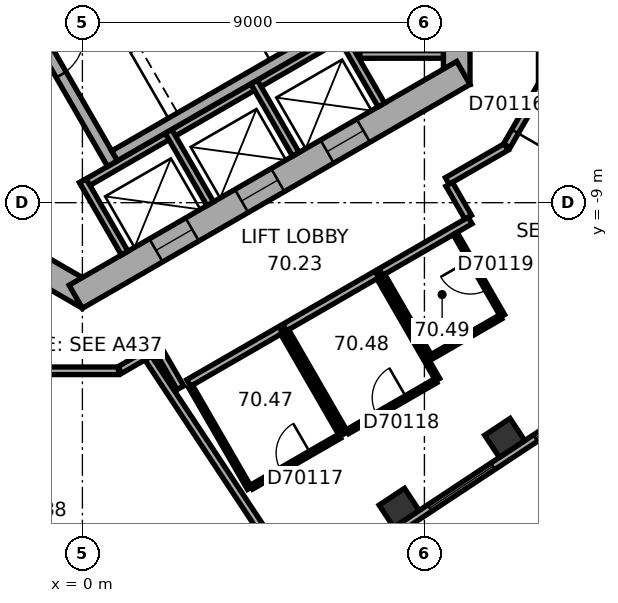
"""IFC4 building model, lengths in metres.
Left out: names, types, materials, properties, quantities, classifications, styles, units other than length and angle.
Written with IfcOpenShell. Run it as: python <this file> out.ifc"""

import sys

from ifc_helpers import new_model, si_unit, direction, frame, frame_2d, origin, origin_2d, place, context, subcontext, project, spatial, rectangle, extrude, element, fill, save


model = new_model("IFC4")
c1 = context("Model", 3, precision=1e-05, world=origin(), true_north=direction((0.0, 1.0)))
c2 = subcontext(c1, "Body", "Model", "MODEL_VIEW")
j1 = project(units=[si_unit("LENGTHUNIT", "METRE"), si_unit("PLANEANGLEUNIT", "RADIAN")], contexts=[c1])
p1 = place(None, origin())
s1 = spatial("IfcSite", under=j1, at=p1, CompositionType="ELEMENT")
p2 = place(p1, origin())
s2 = spatial("IfcBuilding", under=s1, at=p2, CompositionType="ELEMENT")
p3 = place(p2, frame((0.0, 0.0, 285.7)))
s3 = spatial("IfcBuildingStorey", under=s2, at=p3, CompositionType="ELEMENT", Elevation=285.7)
for number, where, z_axis, x_axis in (
    (1, (8.335, -17.028, 0.0), (0.0, 0.0, 1.0), (0.834, 0.552, 0.0)),
    (2, (11.113, -15.189, 0.0), (0.0, 0.0, 1.0), (0.834, 0.552, 0.0)),
):
    element("IfcColumn", number, at=place(p3, frame(where, z_axis=z_axis, x_axis=x_axis)), inside=s3, PredefinedType="COLUMN", context=c2, shape_type="SweptSolid", body=[
        extrude(rectangle(XDim=0.8, YDim=0.7, at=origin_2d()), origin(), (0.0, 0.0, 1.0), 3.7),
    ])
p4 = place(p3, frame((9.85, -5.889, 0.0), z_axis=(0.0, 0.0, 1.0), x_axis=(0.0, 1.0, 0.0)))
e3 = element("IfcWall", 3, at=p4, inside=s3, PredefinedType="SHEAR", context=c2, shape_type="SweptSolid", body=[
    extrude(rectangle(XDim=11.778, YDim=0.7, at=frame_2d((5.889, 0.0))), origin(), (0.0, 0.0, 1.0), 3.7),
])
p5 = place(p4, frame((6.089, 0.0, 0.0)))
e4 = element("IfcOpeningElement", 4, at=p5, cuts=e3, PredefinedType="OPENING", context=c2, shape_type="SweptSolid", body=[
    extrude(rectangle(XDim=1.5, YDim=2.1, at=frame_2d((0.75, 1.05))), frame((0.0, 0.36, 0.0), z_axis=(0.0, -1.0, 0.0), x_axis=(1.0, 0.0, 0.0)), (0.0, 0.0, 1.0), 0.72),
])
p6 = place(p4, frame((2.939, 0.0, 0.0)))
e5 = element("IfcOpeningElement", 5, at=p6, cuts=e3, PredefinedType="OPENING", context=c2, shape_type="SweptSolid", body=[
    extrude(rectangle(XDim=0.9, YDim=2.1, at=frame_2d((0.45, 1.05))), frame((0.0, 0.36, 0.0), z_axis=(0.0, -1.0, 0.0), x_axis=(1.0, 0.0, 0.0)), (0.0, 0.0, 1.0), 0.72),
])
p7 = place(p3, frame((-10.025, -5.586, 0.0), z_axis=(0.0, 0.0, 1.0), x_axis=(0.866026453023, -0.499998182661, 0.0)))
e6 = element("IfcWall", 6, at=p7, inside=s3, PredefinedType="SHEAR", context=c2, shape_type="SweptSolid", body=[
    extrude(rectangle(XDim=11.778, YDim=0.7, at=frame_2d((5.889, 0.0))), origin(), (0.0, 0.0, 1.0), 3.7),
])
p8 = place(p7, frame((6.089, 0.0, 0.0)))
e7 = element("IfcOpeningElement", 7, at=p8, cuts=e6, PredefinedType="OPENING", context=c2, shape_type="SweptSolid", body=[
    extrude(rectangle(XDim=1.5, YDim=2.1, at=frame_2d((0.75, 1.05))), frame((0.0, 0.36, 0.0), z_axis=(0.0, -1.0, 0.0), x_axis=(1.0, 0.0, 0.0)), (0.0, 0.0, 1.0), 0.72),
])
p9 = place(p7, frame((1.539, 0.0, 0.0)))
e8 = element("IfcOpeningElement", 8, at=p9, cuts=e6, PredefinedType="OPENING", context=c2, shape_type="SweptSolid", body=[
    extrude(rectangle(XDim=1.1, YDim=2.1, at=frame_2d((0.55, 1.05))), frame((0.0, 0.36, 0.0), z_axis=(0.0, -1.0, 0.0), x_axis=(1.0, 0.0, 0.0)), (0.0, 0.0, 1.0), 0.72),
])
p10 = place(p7, frame((4.139, 0.0, 0.0)))
e9 = element("IfcOpeningElement", 9, at=p10, cuts=e6, PredefinedType="OPENING", context=c2, shape_type="SweptSolid", body=[
    extrude(rectangle(XDim=1.1, YDim=2.1, at=frame_2d((0.55, 1.05))), frame((0.0, 0.36, 0.0), z_axis=(0.0, -1.0, 0.0), x_axis=(1.0, 0.0, 0.0)), (0.0, 0.0, 1.0), 0.72),
])
p11 = place(p3, frame((-0.175, -11.475, 0.0), z_axis=(0.0, 0.0, 1.0), x_axis=(0.866026453023, 0.499998182661, 0.0)))
e10 = element("IfcWall", 10, at=p11, inside=s3, PredefinedType="SHEAR", context=c2, shape_type="SweptSolid", body=[
    extrude(rectangle(XDim=11.778, YDim=0.7, at=frame_2d((5.889, 0.0))), origin(), (0.0, 0.0, 1.0), 3.7),
])
p12 = place(p11, frame((2.439, 0.0, 0.0)))
e11 = element("IfcOpeningElement", 11, at=p12, cuts=e10, PredefinedType="OPENING", context=c2, shape_type="SweptSolid", body=[
    extrude(rectangle(XDim=1.1, YDim=2.1, at=frame_2d((0.55, 1.05))), frame((0.0, 0.36, 0.0), z_axis=(0.0, -1.0, 0.0), x_axis=(1.0, 0.0, 0.0)), (0.0, 0.0, 1.0), 0.72),
])
p13 = place(p11, frame((5.039, 0.0, 0.0)))
e12 = element("IfcOpeningElement", 12, at=p13, cuts=e10, PredefinedType="OPENING", context=c2, shape_type="SweptSolid", body=[
    extrude(rectangle(XDim=1.1, YDim=2.1, at=frame_2d((0.55, 1.05))), frame((0.0, 0.36, 0.0), z_axis=(0.0, -1.0, 0.0), x_axis=(1.0, 0.0, 0.0)), (0.0, 0.0, 1.0), 0.72),
])
p14 = place(p11, frame((7.639, 0.0, 0.0)))
e13 = element("IfcOpeningElement", 13, at=p14, cuts=e10, PredefinedType="OPENING", context=c2, shape_type="SweptSolid", body=[
    extrude(rectangle(XDim=1.1, YDim=2.1, at=frame_2d((0.55, 1.05))), frame((0.0, 0.36, 0.0), z_axis=(0.0, -1.0, 0.0), x_axis=(1.0, 0.0, 0.0)), (0.0, 0.0, 1.0), 0.72),
])
p15 = place(p3, frame((2.58, -21.377, 0.0), z_axis=(0.0, 0.0, 1.0), x_axis=(0.833888592176, 0.551932800112, 0.0)))
e14 = element("IfcWall", 14, at=p15, inside=s3, PredefinedType="STANDARD", context=c2, shape_type="SweptSolid", body=[
    extrude(rectangle(XDim=17.731, YDim=0.2, at=frame_2d((8.866, 0.0))), origin(), (0.0, 0.0, 1.0), 3.7),
])
p16 = place(p15, frame((1.202, 0.0, 0.9)))
e15 = element("IfcOpeningElement", 15, at=p16, cuts=e14, PredefinedType="OPENING", context=c2, shape_type="SweptSolid", body=[
    extrude(rectangle(XDim=2.0, YDim=2.0, at=frame_2d((1.0, 1.0))), frame((0.0, 0.11, 0.0), z_axis=(0.0, -1.0, 0.0), x_axis=(1.0, 0.0, 0.0)), (0.0, 0.0, 1.0), 0.22),
])
p17 = place(p15, frame((4.533, 0.0, 0.9)))
e16 = element("IfcOpeningElement", 16, at=p17, cuts=e14, PredefinedType="OPENING", context=c2, shape_type="SweptSolid", body=[
    extrude(rectangle(XDim=2.0, YDim=2.0, at=frame_2d((1.0, 1.0))), frame((0.0, 0.11, 0.0), z_axis=(0.0, -1.0, 0.0), x_axis=(1.0, 0.0, 0.0)), (0.0, 0.0, 1.0), 0.22),
])
p18 = place(p15, frame((7.865, 0.0, 0.9)))
e17 = element("IfcOpeningElement", 17, at=p18, cuts=e14, PredefinedType="OPENING", context=c2, shape_type="SweptSolid", body=[
    extrude(rectangle(XDim=2.0, YDim=2.0, at=frame_2d((1.0, 1.0))), frame((0.0, 0.11, 0.0), z_axis=(0.0, -1.0, 0.0), x_axis=(1.0, 0.0, 0.0)), (0.0, 0.0, 1.0), 0.22),
])
p19 = place(p15, frame((11.197, 0.0, 0.9)))
e18 = element("IfcOpeningElement", 18, at=p19, cuts=e14, PredefinedType="OPENING", context=c2, shape_type="SweptSolid", body=[
    extrude(rectangle(XDim=2.0, YDim=2.0, at=frame_2d((1.0, 1.0))), frame((0.0, 0.11, 0.0), z_axis=(0.0, -1.0, 0.0), x_axis=(1.0, 0.0, 0.0)), (0.0, 0.0, 1.0), 0.22),
])
p20 = place(p15, frame((14.528, 0.0, 0.9)))
e19 = element("IfcOpeningElement", 19, at=p20, cuts=e14, PredefinedType="OPENING", context=c2, shape_type="SweptSolid", body=[
    extrude(rectangle(XDim=2.0, YDim=2.0, at=frame_2d((1.0, 1.0))), frame((0.0, 0.11, 0.0), z_axis=(0.0, -1.0, 0.0), x_axis=(1.0, 0.0, 0.0)), (0.0, 0.0, 1.0), 0.22),
])
p21 = place(p3, frame((7.4, -5.2, 0.0), z_axis=(0.0, 0.0, 1.0), x_axis=(0.0, 1.0, 0.0)))
e20 = element("IfcWall", 20, at=p21, inside=s3, PredefinedType="PARTITIONING", context=c2, shape_type="SweptSolid", body=[
    extrude(rectangle(XDim=5.4, YDim=0.2, at=frame_2d((2.7, 0.0))), origin(), (0.0, 0.0, 1.0), 3.42),
])
p22 = place(p3, frame((7.3, -5.1, 0.0), z_axis=(0.0, 0.0, 1.0), x_axis=(1.0, 0.0, 0.0)))
e21 = element("IfcWall", 21, at=p22, inside=s3, PredefinedType="PARTITIONING", context=c2, shape_type="SweptSolid", body=[
    extrude(rectangle(XDim=2.2, YDim=0.2, at=frame_2d((1.1, 0.0))), origin(), (0.0, 0.0, 1.0), 3.42),
])
p23 = place(p3, frame((-0.024, -8.559, 0.0), z_axis=(0.0, 0.0, 1.0), x_axis=(0.866026010844, 0.49999894854, 0.0)))
e22 = element("IfcWall", 22, at=p23, inside=s3, PredefinedType="PARTITIONING", context=c2, shape_type="SweptSolid", body=[
    extrude(rectangle(XDim=8.0, YDim=0.2, at=frame_2d((4.0, 0.0))), origin(), (0.0, 0.0, 1.0), 3.42),
])
for number, where, z_axis, x_axis in (
    (23, (0.013, -8.422, 0.0), (0.0, 0.0, 1.0), (0.5, -0.866, 0.0)),
    (24, (2.264, -7.122, 0.0), (0.0, 0.0, 1.0), (0.5, -0.866, 0.0)),
    (25, (4.516, -5.822, 0.0), (0.0, 0.0, 1.0), (0.5, -0.866, 0.0)),
    (26, (6.768, -4.522, 0.0), (0.0, 0.0, 1.0), (0.5, -0.866, 0.0)),
):
    element("IfcWall", number, at=place(p3, frame(where, z_axis=z_axis, x_axis=x_axis)), inside=s3, PredefinedType="PARTITIONING", context=c2, shape_type="SweptSolid", body=[
        extrude(rectangle(XDim=2.2, YDim=0.2, at=frame_2d((1.1, 0.0))), origin(), (0.0, 0.0, 1.0), 3.42),
    ])
p24 = place(p3, frame((-1.558, -3.902, 0.0), z_axis=(0.0, 0.0, 1.0), x_axis=(0.499977259774, -0.866038532462, 0.0)))
e27 = element("IfcWall", 27, at=p24, inside=s3, PredefinedType="SHEAR", context=c2, shape_type="SweptSolid", body=[
    extrude(rectangle(XDim=4.7, YDim=0.3, at=frame_2d((2.35, 0.0))), origin(), (0.0, 0.0, 1.0), 3.42),
])
p25 = place(p24, frame((0.8, 0.0, 0.0)))
e28 = element("IfcOpeningElement", 28, at=p25, cuts=e27, PredefinedType="OPENING", context=c2, shape_type="SweptSolid", body=[
    extrude(rectangle(XDim=1.2, YDim=2.1, at=frame_2d((0.6, 1.05))), frame((0.0, 0.16, 0.0), z_axis=(0.0, -1.0, 0.0), x_axis=(1.0, 0.0, 0.0)), (0.0, 0.0, 1.0), 0.32),
])
p26 = place(p3, frame((0.847, -7.767, 0.0), z_axis=(0.0, 0.0, 1.0), x_axis=(0.866027801685, 0.499995846692, 0.0)))
e29 = element("IfcWall", 29, at=p26, inside=s3, PredefinedType="SHEAR", context=c2, shape_type="SweptSolid", body=[
    extrude(rectangle(XDim=7.06, YDim=0.3, at=frame_2d((3.53, 0.0))), origin(), (0.0, 0.0, 1.0), 3.42),
])
p27 = place(p3, frame((-0.91, -13.423, 0.0), z_axis=(0.0, 0.0, 1.0), x_axis=(1.0, 0.0, 0.0)))
e30 = element("IfcWall", 30, at=p27, inside=s3, PredefinedType="PARTITIONING", context=c2, shape_type="SweptSolid", body=[
    extrude(rectangle(XDim=1.86, YDim=0.2, at=frame_2d((0.93, 0.0))), origin(), (0.0, 0.0, 1.0), 3.42),
])
p28 = place(p3, frame((0.985, -13.403, 0.0), z_axis=(0.0, 0.0, 1.0), x_axis=(0.866032814021, 0.499987164874, 0.0)))
e31 = element("IfcWall", 31, at=p28, inside=s3, PredefinedType="PARTITIONING", context=c2, shape_type="SweptSolid", body=[
    extrude(rectangle(XDim=0.798, YDim=0.2, at=frame_2d((0.399, 0.0))), origin(), (0.0, 0.0, 1.0), 3.42),
])
p29 = place(p3, frame((1.979, -12.829, 0.0), z_axis=(0.0, 0.0, 1.0), x_axis=(0.500074377092, -0.865982457891, 0.0)))
e32 = element("IfcWall", 32, at=p29, inside=s3, PredefinedType="PARTITIONING", context=c2, shape_type="SweptSolid", body=[
    extrude(rectangle(XDim=1.201, YDim=0.2, at=frame_2d((0.601, 0.0))), origin(), (0.0, 0.0, 1.0), 3.42),
])
p30 = place(p3, frame((2.796, -13.744, 0.0), z_axis=(0.0, 0.0, 1.0), x_axis=(0.866034573852, 0.49998411664, 0.0)))
e33 = element("IfcWall", 33, at=p30, inside=s3, PredefinedType="PARTITIONING", context=c2, shape_type="SweptSolid", body=[
    extrude(rectangle(XDim=2.8, YDim=0.2, at=frame_2d((1.4, 0.0))), origin(), (0.0, 0.0, 1.0), 3.42),
])
p31 = place(p3, frame((4.396, -16.516, 0.0), z_axis=(0.0, 0.0, 1.0), x_axis=(-0.49999285859, 0.86602952684, 0.0)))
e34 = element("IfcWall", 34, at=p31, inside=s3, PredefinedType="PARTITIONING", context=c2, shape_type="SweptSolid", body=[
    extrude(rectangle(XDim=3.1, YDim=0.12, at=frame_2d((1.55, 0.0))), origin(), (0.0, 0.0, 1.0), 3.42),
])
p32 = place(p3, frame((5.271, -12.431, 0.0), z_axis=(0.0, 0.0, 1.0), x_axis=(0.500026960575, -0.86600983753, 0.0)))
e35 = element("IfcWall", 35, at=p32, inside=s3, PredefinedType="PARTITIONING", context=c2, shape_type="SweptSolid", body=[
    extrude(rectangle(XDim=3.1, YDim=0.12, at=frame_2d((1.55, 0.0))), origin(), (0.0, 0.0, 1.0), 3.42),
])
p33 = place(p3, frame((5.325, -12.284, 0.0), z_axis=(0.0, 0.0, 1.0), x_axis=(0.866034573852, 0.49998411664, 0.0)))
e36 = element("IfcWall", 36, at=p33, inside=s3, PredefinedType="PARTITIONING", context=c2, shape_type="SweptSolid", body=[
    extrude(rectangle(XDim=2.8, YDim=0.2, at=frame_2d((1.4, 0.0))), origin(), (0.0, 0.0, 1.0), 3.42),
])
p34 = place(p3, frame((5.364, -18.575, 0.0), z_axis=(0.0, 0.0, 1.0), x_axis=(-0.55195757761, 0.833872191957, 0.0)))
e37 = element("IfcWall", 37, at=p34, inside=s3, PredefinedType="PARTITIONING", context=c2, shape_type="SweptSolid", body=[
    extrude(rectangle(XDim=6.581, YDim=0.2, at=frame_2d((3.291, 0.0))), origin(), (0.0, 0.0, 1.0), 3.42),
])
p35 = place(p3, frame((6.769, -15.146, 0.0), z_axis=(0.0, 0.0, 1.0), x_axis=(-0.866020236886, -0.500008949224, 0.0)))
e38 = element("IfcWall", 38, at=p35, inside=s3, PredefinedType="PARTITIONING", context=c2, shape_type="SweptSolid", body=[
    extrude(rectangle(XDim=2.68, YDim=0.12, at=frame_2d((1.34, 0.0))), origin(), (0.0, 0.0, 1.0), 3.42),
])
p36 = place(p35, frame((0.89, 0.0, 0.0)))
e39 = element("IfcOpeningElement", 39, at=p36, cuts=e38, PredefinedType="OPENING", context=c2, shape_type="SweptSolid", body=[
    extrude(rectangle(XDim=0.9, YDim=2.1, at=frame_2d((0.45, 1.05))), frame((0.0, 0.07, 0.0), z_axis=(0.0, -1.0, 0.0), x_axis=(1.0, 0.0, 0.0)), (0.0, 0.0, 1.0), 0.14),
])
p37 = place(p3, frame((6.925, -15.056, 0.0), z_axis=(0.0, 0.0, 1.0), x_axis=(-0.49999285859, 0.86602952684, 0.0)))
e40 = element("IfcWall", 40, at=p37, inside=s3, PredefinedType="PARTITIONING", context=c2, shape_type="SweptSolid", body=[
    extrude(rectangle(XDim=3.1, YDim=0.12, at=frame_2d((1.55, 0.0))), origin(), (0.0, 0.0, 1.0), 2.87),
])
p38 = place(p3, frame((7.8, -10.971, 0.0), z_axis=(0.0, 0.0, 1.0), x_axis=(0.500026960575, -0.86600983753, 0.0)))
e41 = element("IfcWall", 41, at=p38, inside=s3, PredefinedType="PARTITIONING", context=c2, shape_type="SweptSolid", body=[
    extrude(rectangle(XDim=3.1, YDim=0.12, at=frame_2d((1.55, 0.0))), origin(), (0.0, 0.0, 1.0), 3.42),
])
p39 = place(p3, frame((7.854, -10.824, 0.0), z_axis=(0.0, 0.0, 1.0), x_axis=(0.866029675718, 0.499992600721, 0.0)))
e42 = element("IfcWall", 42, at=p39, inside=s3, PredefinedType="PARTITIONING", context=c2, shape_type="SweptSolid", body=[
    extrude(rectangle(XDim=2.712, YDim=0.2, at=frame_2d((1.356, 0.0))), origin(), (0.0, 0.0, 1.0), 3.42),
])
p40 = place(p3, frame((9.153, -13.076, 0.0), z_axis=(0.0, 0.0, 1.0), x_axis=(-0.500004234368, 0.866022959057, 0.0)))
e43 = element("IfcWall", 43, at=p40, inside=s3, PredefinedType="PARTITIONING", context=c2, shape_type="SweptSolid", body=[
    extrude(rectangle(XDim=2.5, YDim=0.12, at=frame_2d((1.25, 0.0))), origin(), (0.0, 0.0, 1.0), 3.42),
])
p41 = place(p3, frame((9.298, -13.686, 0.0), z_axis=(0.0, 0.0, 1.0), x_axis=(-0.866020236886, -0.500008949224, 0.0)))
e44 = element("IfcWall", 44, at=p41, inside=s3, PredefinedType="PARTITIONING", context=c2, shape_type="SweptSolid", body=[
    extrude(rectangle(XDim=2.68, YDim=0.12, at=frame_2d((1.34, 0.0))), origin(), (0.0, 0.0, 1.0), 3.42),
])
p42 = place(p41, frame((0.89, 0.0, 0.0)))
e45 = element("IfcOpeningElement", 45, at=p42, cuts=e44, PredefinedType="OPENING", context=c2, shape_type="SweptSolid", body=[
    extrude(rectangle(XDim=0.9, YDim=2.1, at=frame_2d((0.45, 1.05))), frame((0.0, 0.07, 0.0), z_axis=(0.0, -1.0, 0.0), x_axis=(1.0, 0.0, 0.0)), (0.0, 0.0, 1.0), 0.14),
])
p43 = place(p3, frame((9.602, -8.428, 0.0), z_axis=(0.0, 0.0, 1.0), x_axis=(0.865999114786, 0.500045531117, 0.0)))
e46 = element("IfcWall", 46, at=p43, inside=s3, PredefinedType="PARTITIONING", context=c2, shape_type="SweptSolid", body=[
    extrude(rectangle(XDim=1.788, YDim=0.2, at=frame_2d((0.894, 0.0))), origin(), (0.0, 0.0, 1.0), 3.42),
])
p44 = place(p3, frame((9.809, -9.811, 0.0), z_axis=(0.0, 0.0, 1.0), x_axis=(0.499961950354, -0.866047370643, 0.0)))
e47 = element("IfcWall", 47, at=p44, inside=s3, PredefinedType="PARTITIONING", context=c2, shape_type="SweptSolid", body=[
    extrude(rectangle(XDim=2.5, YDim=0.12, at=frame_2d((1.25, 0.0))), origin(), (0.0, 0.0, 1.0), 3.42),
])
p45 = place(p44, frame((0.8, 0.0, 0.0)))
e48 = element("IfcOpeningElement", 48, at=p45, cuts=e47, PredefinedType="OPENING", context=c2, shape_type="SweptSolid", body=[
    extrude(rectangle(XDim=0.9, YDim=2.1, at=frame_2d((0.45, 1.05))), frame((0.0, 0.07, 0.0), z_axis=(0.0, -1.0, 0.0), x_axis=(1.0, 0.0, 0.0)), (0.0, 0.0, 1.0), 0.14),
])
p46 = place(p3, frame((10.152, -9.382, 0.0), z_axis=(0.0, 0.0, 1.0), x_axis=(-0.499968756647, 0.866043441391, 0.0)))
e49 = element("IfcWall", 49, at=p46, inside=s3, PredefinedType="PARTITIONING", context=c2, shape_type="SweptSolid", body=[
    extrude(rectangle(XDim=1.001, YDim=0.2, at=frame_2d((0.5, 0.0))), origin(), (0.0, 0.0, 1.0), 3.42),
])
p47 = place(p3, frame((11.007, -12.006, 0.0), z_axis=(0.0, 0.0, 1.0), x_axis=(-0.866009661879, -0.500027264788, 0.0)))
e50 = element("IfcWall", 50, at=p47, inside=s3, PredefinedType="PARTITIONING", context=c2, shape_type="SweptSolid", body=[
    extrude(rectangle(XDim=2.08, YDim=0.12, at=frame_2d((1.04, 0.0))), origin(), (0.0, 0.0, 1.0), 3.42),
])
p48 = place(p3, frame((11.17, -7.5, 0.0), z_axis=(0.0, 0.0, 1.0), x_axis=(0.500006454166, 0.866021677438, 0.0)))
e51 = element("IfcWall", 51, at=p48, inside=s3, PredefinedType="PARTITIONING", context=c2, shape_type="SweptSolid", body=[
    extrude(rectangle(XDim=1.86, YDim=0.2, at=frame_2d((0.93, 0.0))), origin(), (0.0, 0.0, 1.0), 3.42),
])
p49 = place(p48, frame((0.43, 0.0, 0.0)))
e52 = element("IfcOpeningElement", 52, at=p49, cuts=e51, PredefinedType="OPENING", context=c2, shape_type="SweptSolid", body=[
    extrude(rectangle(XDim=1.0, YDim=2.1, at=frame_2d((0.5, 1.05))), frame((0.0, 0.11, 0.0), z_axis=(0.0, -1.0, 0.0), x_axis=(1.0, 0.0, 0.0)), (0.0, 0.0, 1.0), 0.22),
])
p50 = place(p18, origin())
e53 = element("IfcWindow", 53, at=p50, inside=s3, PartitioningType="SINGLE_PANEL", PredefinedType="WINDOW", context=c2, shape_type="SweptSolid", body=[
    extrude(rectangle(XDim=2.0, YDim=2.0, at=frame_2d((1.0, 1.0))), frame((0.0, 0.03, 0.0), z_axis=(0.0, -1.0, 0.0), x_axis=(1.0, 0.0, 0.0)), (0.0, 0.0, 1.0), 0.06),
])
fill(e17, e53)
p51 = place(p19, origin())
e54 = element("IfcWindow", 54, at=p51, inside=s3, PartitioningType="SINGLE_PANEL", PredefinedType="WINDOW", context=c2, shape_type="SweptSolid", body=[
    extrude(rectangle(XDim=2.0, YDim=2.0, at=frame_2d((1.0, 1.0))), frame((0.0, 0.03, 0.0), z_axis=(0.0, -1.0, 0.0), x_axis=(1.0, 0.0, 0.0)), (0.0, 0.0, 1.0), 0.06),
])
fill(e18, e54)
p52 = place(p25, origin())
e55 = element("IfcDoor", 55, at=p52, inside=s3, OperationType="SINGLE_SWING_RIGHT", PredefinedType="DOOR", context=c2, shape_type="SweptSolid", body=[
    extrude(rectangle(XDim=1.2, YDim=2.1, at=frame_2d((0.6, 1.05))), frame((0.0, 0.025, 0.0), z_axis=(0.0, -1.0, 0.0), x_axis=(1.0, 0.0, 0.0)), (0.0, 0.0, 1.0), 0.05),
])
fill(e28, e55)
p53 = place(p12, origin())
e56 = element("IfcDoor", 56, at=p53, inside=s3, OperationType="DOUBLE_DOOR_SLIDING", PredefinedType="DOOR", context=c2, shape_type="SweptSolid", body=[
    extrude(rectangle(XDim=1.1, YDim=2.1, at=frame_2d((0.55, 1.05))), frame((0.0, 0.025, 0.0), z_axis=(0.0, -1.0, 0.0), x_axis=(1.0, 0.0, 0.0)), (0.0, 0.0, 1.0), 0.05),
])
fill(e11, e56)
p54 = place(p13, origin())
e57 = element("IfcDoor", 57, at=p54, inside=s3, OperationType="DOUBLE_DOOR_SLIDING", PredefinedType="DOOR", context=c2, shape_type="SweptSolid", body=[
    extrude(rectangle(XDim=1.1, YDim=2.1, at=frame_2d((0.55, 1.05))), frame((0.0, 0.025, 0.0), z_axis=(0.0, -1.0, 0.0), x_axis=(1.0, 0.0, 0.0)), (0.0, 0.0, 1.0), 0.05),
])
fill(e12, e57)
p55 = place(p14, origin())
e58 = element("IfcDoor", 58, at=p55, inside=s3, OperationType="DOUBLE_DOOR_SLIDING", PredefinedType="DOOR", context=c2, shape_type="SweptSolid", body=[
    extrude(rectangle(XDim=1.1, YDim=2.1, at=frame_2d((0.55, 1.05))), frame((0.0, 0.025, 0.0), z_axis=(0.0, -1.0, 0.0), x_axis=(1.0, 0.0, 0.0)), (0.0, 0.0, 1.0), 0.05),
])
fill(e13, e58)
p56 = place(p49, origin())
e59 = element("IfcDoor", 59, at=p56, inside=s3, OperationType="SINGLE_SWING_LEFT", PredefinedType="DOOR", context=c2, shape_type="SweptSolid", body=[
    extrude(rectangle(XDim=1.0, YDim=2.1, at=frame_2d((0.5, 1.05))), frame((0.0, 0.025, 0.0), z_axis=(0.0, -1.0, 0.0), x_axis=(1.0, 0.0, 0.0)), (0.0, 0.0, 1.0), 0.05),
])
fill(e52, e59)
p57 = place(p36, origin())
e60 = element("IfcDoor", 60, at=p57, inside=s3, OperationType="SINGLE_SWING_LEFT", PredefinedType="DOOR", context=c2, shape_type="SweptSolid", body=[
    extrude(rectangle(XDim=0.9, YDim=2.1, at=frame_2d((0.45, 1.05))), frame((0.0, 0.025, 0.0), z_axis=(0.0, -1.0, 0.0), x_axis=(1.0, 0.0, 0.0)), (0.0, 0.0, 1.0), 0.05),
])
fill(e39, e60)
p58 = place(p42, origin())
e61 = element("IfcDoor", 61, at=p58, inside=s3, OperationType="SINGLE_SWING_LEFT", PredefinedType="DOOR", context=c2, shape_type="SweptSolid", body=[
    extrude(rectangle(XDim=0.9, YDim=2.1, at=frame_2d((0.45, 1.05))), frame((0.0, 0.025, 0.0), z_axis=(0.0, -1.0, 0.0), x_axis=(1.0, 0.0, 0.0)), (0.0, 0.0, 1.0), 0.05),
])
fill(e45, e61)
p59 = place(p45, origin())
e62 = element("IfcDoor", 62, at=p59, inside=s3, OperationType="SINGLE_SWING_LEFT", PredefinedType="DOOR", context=c2, shape_type="SweptSolid", body=[
    extrude(rectangle(XDim=0.9, YDim=2.1, at=frame_2d((0.45, 1.05))), frame((0.0, 0.025, 0.0), z_axis=(0.0, -1.0, 0.0), x_axis=(1.0, 0.0, 0.0)), (0.0, 0.0, 1.0), 0.05),
])
fill(e48, e62)
save(model, sys.argv[1])
